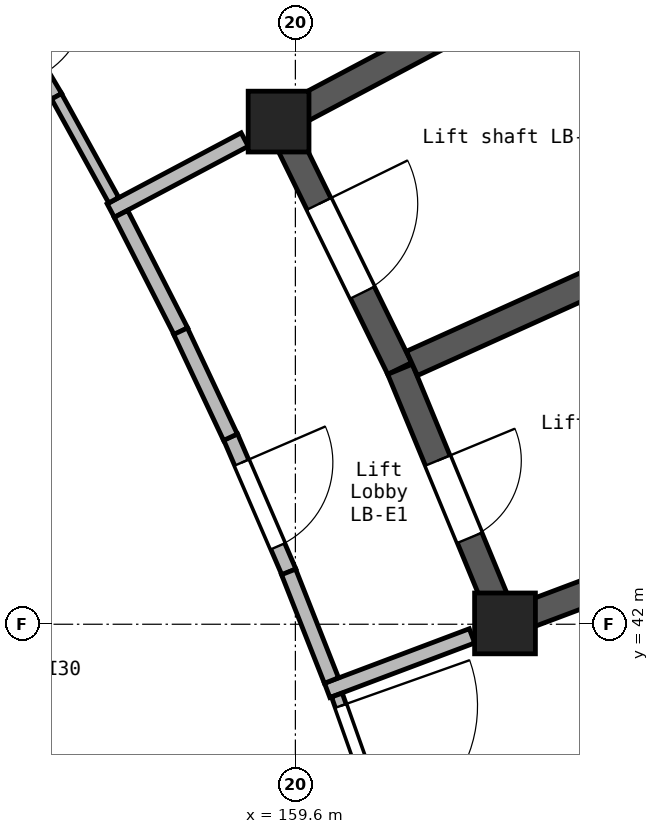
"""IFC4 building model, lengths in metres.
Left out: names, types, materials, properties, quantities, classifications, styles, units other than length and angle.
Written with IfcOpenShell. Run it as: python <this file> out.ifc"""

import sys

from ifc_helpers import new_model, si_unit, direction, frame, frame_2d, origin, origin_2d, place, context, subcontext, project, spatial, rectangle, extrude, element, fill, save


model = new_model("IFC4")
c1 = context("Model", 3, precision=1e-05, world=origin(), true_north=direction((0.0, 1.0)))
c2 = subcontext(c1, "Body", "Model", "MODEL_VIEW")
j1 = project(units=[si_unit("LENGTHUNIT", "METRE"), si_unit("PLANEANGLEUNIT", "RADIAN")], contexts=[c1])
p1 = place(None, origin())
s1 = spatial("IfcSite", under=j1, at=p1, CompositionType="ELEMENT")
p2 = place(p1, origin())
s2 = spatial("IfcBuilding", under=s1, at=p2, CompositionType="ELEMENT")
p3 = place(p2, frame((0.0, 0.0, 16.8)))
s3 = spatial("IfcBuildingStorey", under=s2, at=p3, CompositionType="ELEMENT", Elevation=16.8)
for number, where, z_axis, x_axis in (
    (1, (159.379, 48.613, 0.0), (0.0, 0.0, 1.0), (1.0, 0.0, 0.0)),
    (2, (162.358, 42.011, 0.0), (0.0, 0.0, 1.0), (1.0, 0.0, 0.0)),
):
    element("IfcColumn", number, at=place(p3, frame(where, z_axis=z_axis, x_axis=x_axis)), inside=s3, PredefinedType="COLUMN", context=c2, shape_type="SweptSolid", body=[
        extrude(rectangle(XDim=0.8, YDim=0.8, at=origin_2d()), origin(), (0.0, 0.0, 1.0), 4.2),
    ])
p4 = place(p3, frame((159.224, 48.531, 0.0), z_axis=(0.0, 0.0, 1.0), x_axis=(0.883393138637, 0.468632652094, 0.0)))
e3 = element("IfcWall", 3, at=p4, inside=s3, PredefinedType="SHEAR", context=c2, shape_type="SweptSolid", body=[
    extrude(rectangle(XDim=5.751, YDim=0.35, at=frame_2d((2.875, 0.0))), origin(), (0.0, 0.0, 1.0), 4.2),
])
p5 = place(p3, frame((159.456, 48.456, 0.0), z_axis=(0.0, 0.0, 1.0), x_axis=(0.440221126053, -0.89788939195, 0.0)))
e4 = element("IfcWall", 4, at=p5, inside=s3, PredefinedType="SHEAR", context=c2, shape_type="SweptSolid", body=[
    extrude(rectangle(XDim=3.442, YDim=0.35, at=frame_2d((1.721, 0.0))), origin(), (0.0, 0.0, 1.0), 4.2),
])
p6 = place(p5, frame((1.031, 0.0, 0.0)))
e5 = element("IfcOpeningElement", 5, at=p6, cuts=e4, PredefinedType="OPENING", context=c2, shape_type="SweptSolid", body=[
    extrude(rectangle(XDim=1.3, YDim=2.1, at=frame_2d((0.65, 1.05))), frame((0.0, 0.185, 0.0), z_axis=(0.0, -1.0, 0.0), x_axis=(1.0, 0.0, 0.0)), (0.0, 0.0, 1.0), 0.37),
])
p7 = place(p3, frame((160.976, 45.355, 0.0), z_axis=(0.0, 0.0, 1.0), x_axis=(0.381990591944, -0.924166212143, 0.0)))
e6 = element("IfcWall", 6, at=p7, inside=s3, PredefinedType="SHEAR", context=c2, shape_type="SweptSolid", body=[
    extrude(rectangle(XDim=3.443, YDim=0.35, at=frame_2d((1.721, 0.0))), origin(), (0.0, 0.0, 1.0), 4.2),
])
p8 = place(p7, frame((1.3, 0.0, 0.0)))
e7 = element("IfcOpeningElement", 7, at=p8, cuts=e6, PredefinedType="OPENING", context=c2, shape_type="SweptSolid", body=[
    extrude(rectangle(XDim=1.1, YDim=2.1, at=frame_2d((0.55, 1.05))), frame((0.0, 0.185, 0.0), z_axis=(0.0, -1.0, 0.0), x_axis=(1.0, 0.0, 0.0)), (0.0, 0.0, 1.0), 0.37),
])
p9 = place(p3, frame((161.134, 45.432, 0.0), z_axis=(0.0, 0.0, 1.0), x_axis=(0.911564728385, 0.411156595427, 0.0)))
e8 = element("IfcWall", 8, at=p9, inside=s3, PredefinedType="SHEAR", context=c2, shape_type="SweptSolid", body=[
    extrude(rectangle(XDim=5.05, YDim=0.35, at=frame_2d((2.525, 0.0))), origin(), (0.0, 0.0, 1.0), 4.2),
])
p10 = place(p3, frame((162.194, 41.949, 0.0), z_axis=(0.0, 0.0, 1.0), x_axis=(0.935920223106, 0.352212061095, 0.0)))
e9 = element("IfcWall", 9, at=p10, inside=s3, PredefinedType="SHEAR", context=c2, shape_type="SweptSolid", body=[
    extrude(rectangle(XDim=5.75, YDim=0.35, at=frame_2d((2.875, 0.0))), origin(), (0.0, 0.0, 1.0), 4.2),
])
p11 = place(p3, frame((160.018, 41.13, 0.0), z_axis=(0.0, 0.0, 1.0), x_axis=(0.935835444075, 0.352437259115, 0.0)))
e10 = element("IfcWall", 10, at=p11, inside=s3, PredefinedType="SOLIDWALL", context=c2, shape_type="SweptSolid", body=[
    extrude(rectangle(XDim=2.036, YDim=0.2, at=frame_2d((1.018, 0.0))), origin(), (0.0, 0.0, 1.0), 3.9),
])
p12 = place(p3, frame((157.171, 47.442, 0.0), z_axis=(0.0, 0.0, 1.0), x_axis=(0.883475149074, 0.468478026133, 0.0)))
e11 = element("IfcWall", 11, at=p12, inside=s3, PredefinedType="SOLIDWALL", context=c2, shape_type="SweptSolid", body=[
    extrude(rectangle(XDim=1.995, YDim=0.2, at=frame_2d((0.998, 0.0))), origin(), (0.0, 0.0, 1.0), 3.9),
])
p13 = place(p3, frame((158.747, 44.465, 0.0), z_axis=(0.0, 0.0, 1.0), x_axis=(0.396322487651, -0.918111368943, 0.0)))
e12 = element("IfcWall", 12, at=p13, inside=s3, PredefinedType="SOLIDWALL", context=c2, shape_type="SweptSolid", body=[
    extrude(rectangle(XDim=1.936, YDim=0.2, at=frame_2d((0.968, 0.0))), origin(), (0.0, 0.0, 1.0), 3.9),
])
p14 = place(p13, frame((0.368, 0.0, 0.0)))
e13 = element("IfcOpeningElement", 13, at=p14, cuts=e12, PredefinedType="OPENING", context=c2, shape_type="SweptSolid", body=[
    extrude(rectangle(XDim=1.2, YDim=2.1, at=frame_2d((0.6, 1.05))), frame((0.0, 0.11, 0.0), z_axis=(0.0, -1.0, 0.0), x_axis=(1.0, 0.0, 0.0)), (0.0, 0.0, 1.0), 0.22),
])
p15 = place(p3, frame((157.305, 47.399, 0.0), z_axis=(0.0, 0.0, 1.0), x_axis=(0.454575201636, -0.890708361955, 0.0)))
e14 = element("IfcWall", 14, at=p15, inside=s3, PredefinedType="SOLIDWALL", context=c2, shape_type="SweptSolid", body=[
    extrude(rectangle(XDim=1.734, YDim=0.2, at=frame_2d((0.867, 0.0))), origin(), (0.0, 0.0, 1.0), 3.9),
])
p16 = place(p3, frame((158.089, 45.855, 0.0), z_axis=(0.0, 0.0, 1.0), x_axis=(0.42579703633, -0.904818702201, 0.0)))
e15 = element("IfcWall", 15, at=p16, inside=s3, PredefinedType="SOLIDWALL", context=c2, shape_type="SweptSolid", body=[
    extrude(rectangle(XDim=1.541, YDim=0.2, at=frame_2d((0.771, 0.0))), origin(), (0.0, 0.0, 1.0), 3.9),
])
p17 = place(p3, frame((159.51, 42.689, 0.0), z_axis=(0.0, 0.0, 1.0), x_axis=(0.367195475631, -0.930143796773, 0.0)))
e16 = element("IfcWall", 16, at=p17, inside=s3, PredefinedType="SOLIDWALL", context=c2, shape_type="SweptSolid", body=[
    extrude(rectangle(XDim=1.537, YDim=0.2, at=frame_2d((0.768, 0.0))), origin(), (0.0, 0.0, 1.0), 3.9),
])
p18 = place(p3, frame((160.146, 41.068, 0.0), z_axis=(0.0, 0.0, 1.0), x_axis=(0.334170983673, -0.942512468708, 0.0)))
e17 = element("IfcWall", 17, at=p18, inside=s3, PredefinedType="PARTITIONING", context=c2, shape_type="SweptSolid", body=[
    extrude(rectangle(XDim=2.079, YDim=0.15, at=frame_2d((1.04, 0.0))), origin(), (0.0, 0.0, 1.0), 3.9),
])
p19 = place(p18, frame((0.151, 0.0, 0.0)))
e18 = element("IfcOpeningElement", 18, at=p19, cuts=e17, PredefinedType="OPENING", context=c2, shape_type="SweptSolid", body=[
    extrude(rectangle(XDim=1.8, YDim=2.1, at=frame_2d((0.9, 1.05))), frame((0.0, 0.085, 0.0), z_axis=(0.0, -1.0, 0.0), x_axis=(1.0, 0.0, 0.0)), (0.0, 0.0, 1.0), 0.17),
])
p20 = place(p3, frame((155.498, 50.566, 0.0), z_axis=(0.0, 0.0, 1.0), x_axis=(0.510320389621, -0.859984360287, 0.0)))
e19 = element("IfcWall", 19, at=p20, inside=s3, PredefinedType="PARTITIONING", context=c2, shape_type="SweptSolid", body=[
    extrude(rectangle(XDim=1.886, YDim=0.15, at=frame_2d((0.943, 0.0))), origin(), (0.0, 0.0, 1.0), 3.9),
])
p21 = place(p20, frame((0.343, 0.0, 0.0)))
e20 = element("IfcOpeningElement", 20, at=p21, cuts=e19, PredefinedType="OPENING", context=c2, shape_type="SweptSolid", body=[
    extrude(rectangle(XDim=1.2, YDim=2.1, at=frame_2d((0.6, 1.05))), frame((0.0, 0.085, 0.0), z_axis=(0.0, -1.0, 0.0), x_axis=(1.0, 0.0, 0.0)), (0.0, 0.0, 1.0), 0.17),
])
p22 = place(p3, frame((156.457, 48.945, 0.0), z_axis=(0.0, 0.0, 1.0), x_axis=(0.482411223267, -0.875944867937, 0.0)))
e21 = element("IfcWall", 21, at=p22, inside=s3, PredefinedType="PARTITIONING", context=c2, shape_type="SweptSolid", body=[
    extrude(rectangle(XDim=1.56, YDim=0.15, at=frame_2d((0.78, 0.0))), origin(), (0.0, 0.0, 1.0), 3.9),
])
p23 = place(p14, origin())
e22 = element("IfcDoor", 22, at=p23, inside=s3, OperationType="SINGLE_SWING_LEFT", PredefinedType="DOOR", context=c2, shape_type="SweptSolid", body=[
    extrude(rectangle(XDim=1.2, YDim=2.1, at=frame_2d((0.6, 1.05))), frame((0.0, 0.025, 0.0), z_axis=(0.0, -1.0, 0.0), x_axis=(1.0, 0.0, 0.0)), (0.0, 0.0, 1.0), 0.05),
])
fill(e13, e22)
p24 = place(p19, frame((1.8, 0.0, 0.0), z_axis=(0.0, 0.0, 1.0), x_axis=(-1.0, 0.0, 0.0)))
e23 = element("IfcDoor", 23, at=p24, inside=s3, OperationType="DOUBLE_DOOR_SINGLE_SWING", PredefinedType="DOOR", context=c2, shape_type="SweptSolid", body=[
    extrude(rectangle(XDim=1.8, YDim=2.1, at=frame_2d((0.9, 1.05))), frame((0.0, 0.025, 0.0), z_axis=(0.0, -1.0, 0.0), x_axis=(1.0, 0.0, 0.0)), (0.0, 0.0, 1.0), 0.05),
])
fill(e18, e23)
p25 = place(p6, origin())
e24 = element("IfcDoor", 24, at=p25, inside=s3, OperationType="DOUBLE_DOOR_SLIDING", PredefinedType="DOOR", context=c2, shape_type="SweptSolid", body=[
    extrude(rectangle(XDim=1.3, YDim=2.1, at=frame_2d((0.65, 1.05))), frame((0.0, 0.025, 0.0), z_axis=(0.0, -1.0, 0.0), x_axis=(1.0, 0.0, 0.0)), (0.0, 0.0, 1.0), 0.05),
])
fill(e5, e24)
p26 = place(p8, origin())
e25 = element("IfcDoor", 25, at=p26, inside=s3, OperationType="DOUBLE_DOOR_SLIDING", PredefinedType="DOOR", context=c2, shape_type="SweptSolid", body=[
    extrude(rectangle(XDim=1.1, YDim=2.1, at=frame_2d((0.55, 1.05))), frame((0.0, 0.025, 0.0), z_axis=(0.0, -1.0, 0.0), x_axis=(1.0, 0.0, 0.0)), (0.0, 0.0, 1.0), 0.05),
])
fill(e7, e25)
save(model, sys.argv[1])
